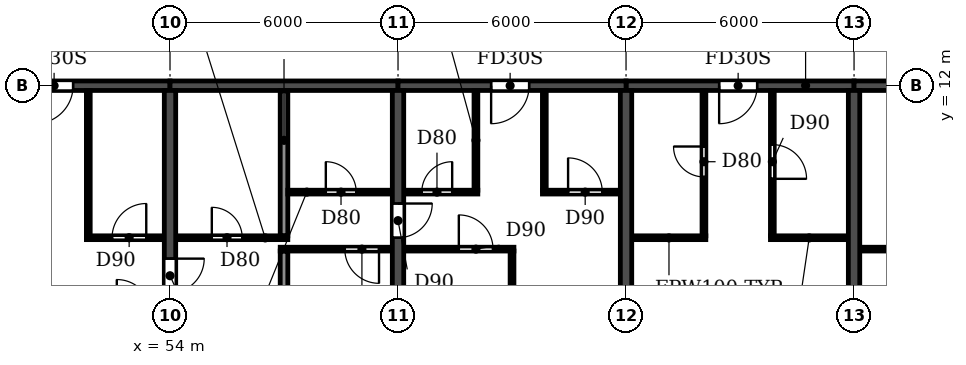
"""IFC4 building model, lengths in metres.
Left out: names, types, materials, properties, quantities, classifications, styles, units other than length and angle.
Written with IfcOpenShell. Run it as: python <this file> out.ifc"""

import sys

from ifc_helpers import new_model, si_unit, direction, frame, frame_2d, origin, place, context, subcontext, project, spatial, rectangle, extrude, element, fill, save


model = new_model("IFC4")
c1 = context("Model", 3, precision=1e-05, world=origin(), true_north=direction((0.0, 1.0)))
c2 = subcontext(c1, "Body", "Model", "MODEL_VIEW")
j1 = project(units=[si_unit("LENGTHUNIT", "METRE"), si_unit("PLANEANGLEUNIT", "RADIAN")], contexts=[c1])
p1 = place(None, origin())
s1 = spatial("IfcSite", under=j1, at=p1, CompositionType="ELEMENT")
p2 = place(p1, origin())
s2 = spatial("IfcBuilding", under=s1, at=p2, CompositionType="ELEMENT")
p3 = place(p2, frame((0.0, 0.0, 152.1)))
s3 = spatial("IfcBuildingStorey", under=s2, at=p3, CompositionType="ELEMENT", Elevation=152.1)
p4 = place(p3, frame((54.0, 0.2, 0.0), z_axis=(0.0, 0.0, 1.0), x_axis=(0.0, 1.0, 0.0)))
e1 = element("IfcWall", 1, at=p4, inside=s3, PredefinedType="SHEAR", context=c2, shape_type="SweptSolid", body=[
    extrude(rectangle(XDim=11.675, YDim=0.3, at=frame_2d((5.837, 0.0))), origin(), (0.0, 0.0, 1.0), 3.07),
])
p5 = place(p4, frame((6.35, 0.0, 0.0)))
e2 = element("IfcOpeningElement", 2, at=p5, cuts=e1, PredefinedType="OPENING", context=c2, shape_type="SweptSolid", body=[
    extrude(rectangle(XDim=0.9, YDim=2.1, at=frame_2d((0.45, 1.05))), frame((0.0, 0.16, 0.0), z_axis=(0.0, -1.0, 0.0), x_axis=(1.0, 0.0, 0.0)), (0.0, 0.0, 1.0), 0.32),
])
p6 = place(p3, frame((60.0, 0.2, 0.0), z_axis=(0.0, 0.0, 1.0), x_axis=(0.0, 1.0, 0.0)))
e3 = element("IfcWall", 3, at=p6, inside=s3, PredefinedType="SHEAR", context=c2, shape_type="SweptSolid", body=[
    extrude(rectangle(XDim=11.675, YDim=0.3, at=frame_2d((5.837, 0.0))), origin(), (0.0, 0.0, 1.0), 3.07),
])
p7 = place(p6, frame((7.8, 0.0, 0.0)))
e4 = element("IfcOpeningElement", 4, at=p7, cuts=e3, PredefinedType="OPENING", context=c2, shape_type="SweptSolid", body=[
    extrude(rectangle(XDim=0.9, YDim=2.1, at=frame_2d((0.45, 1.05))), frame((0.0, 0.16, 0.0), z_axis=(0.0, -1.0, 0.0), x_axis=(1.0, 0.0, 0.0)), (0.0, 0.0, 1.0), 0.32),
])
for number, where, z_axis, x_axis in (
    (5, (66.0, 0.2, 0.0), (0.0, 0.0, 1.0), (0.0, 1.0, 0.0)),
    (6, (72.0, 0.2, 0.0), (0.0, 0.0, 1.0), (0.0, 1.0, 0.0)),
):
    element("IfcWall", number, at=place(p3, frame(where, z_axis=z_axis, x_axis=x_axis)), inside=s3, PredefinedType="SHEAR", context=c2, shape_type="SweptSolid", body=[
        extrude(rectangle(XDim=11.675, YDim=0.3, at=frame_2d((5.837, 0.0))), origin(), (0.0, 0.0, 1.0), 3.07),
    ])
p8 = place(p3, frame((48.0, 12.0, 0.0), z_axis=(0.0, 0.0, 1.0), x_axis=(1.0, 0.0, 0.0)))
e7 = element("IfcWall", 7, at=p8, inside=s3, PredefinedType="SHEAR", context=c2, shape_type="SweptSolid", body=[
    extrude(rectangle(XDim=6.0, YDim=0.25, at=frame_2d((3.0, 0.0))), origin(), (0.0, 0.0, 1.0), 2.47),
])
p9 = place(p8, frame((2.45, 0.0, 0.0)))
e8 = element("IfcOpeningElement", 8, at=p9, cuts=e7, PredefinedType="OPENING", context=c2, shape_type="SweptSolid", body=[
    extrude(rectangle(XDim=1.0, YDim=2.1, at=frame_2d((0.5, 1.05))), frame((0.0, 0.135, 0.0), z_axis=(0.0, -1.0, 0.0), x_axis=(1.0, 0.0, 0.0)), (0.0, 0.0, 1.0), 0.27),
])
p10 = place(p3, frame((54.0, 12.0, 0.0), z_axis=(0.0, 0.0, 1.0), x_axis=(1.0, 0.0, 0.0)))
e9 = element("IfcWall", 9, at=p10, inside=s3, PredefinedType="SHEAR", context=c2, shape_type="SweptSolid", body=[
    extrude(rectangle(XDim=6.0, YDim=0.25, at=frame_2d((3.0, 0.0))), origin(), (0.0, 0.0, 1.0), 2.47),
])
p11 = place(p3, frame((60.0, 12.0, 0.0), z_axis=(0.0, 0.0, 1.0), x_axis=(1.0, 0.0, 0.0)))
e10 = element("IfcWall", 10, at=p11, inside=s3, PredefinedType="SHEAR", context=c2, shape_type="SweptSolid", body=[
    extrude(rectangle(XDim=6.0, YDim=0.25, at=frame_2d((3.0, 0.0))), origin(), (0.0, 0.0, 1.0), 2.47),
])
p12 = place(p11, frame((2.45, 0.0, 0.0)))
e11 = element("IfcOpeningElement", 11, at=p12, cuts=e10, PredefinedType="OPENING", context=c2, shape_type="SweptSolid", body=[
    extrude(rectangle(XDim=1.0, YDim=2.1, at=frame_2d((0.5, 1.05))), frame((0.0, 0.135, 0.0), z_axis=(0.0, -1.0, 0.0), x_axis=(1.0, 0.0, 0.0)), (0.0, 0.0, 1.0), 0.27),
])
p13 = place(p3, frame((66.0, 12.0, 0.0), z_axis=(0.0, 0.0, 1.0), x_axis=(1.0, 0.0, 0.0)))
e12 = element("IfcWall", 12, at=p13, inside=s3, PredefinedType="SHEAR", context=c2, shape_type="SweptSolid", body=[
    extrude(rectangle(XDim=6.0, YDim=0.25, at=frame_2d((3.0, 0.0))), origin(), (0.0, 0.0, 1.0), 2.47),
])
p14 = place(p13, frame((2.45, 0.0, 0.0)))
e13 = element("IfcOpeningElement", 13, at=p14, cuts=e12, PredefinedType="OPENING", context=c2, shape_type="SweptSolid", body=[
    extrude(rectangle(XDim=1.0, YDim=2.1, at=frame_2d((0.5, 1.05))), frame((0.0, 0.135, 0.0), z_axis=(0.0, -1.0, 0.0), x_axis=(1.0, 0.0, 0.0)), (0.0, 0.0, 1.0), 0.27),
])
p15 = place(p3, frame((72.0, 12.0, 0.0), z_axis=(0.0, 0.0, 1.0), x_axis=(1.0, 0.0, 0.0)))
e14 = element("IfcWall", 14, at=p15, inside=s3, PredefinedType="SHEAR", context=c2, shape_type="SweptSolid", body=[
    extrude(rectangle(XDim=6.0, YDim=0.25, at=frame_2d((3.0, 0.0))), origin(), (0.0, 0.0, 1.0), 2.47),
])
p16 = place(p15, frame((2.45, 0.0, 0.0)))
e15 = element("IfcOpeningElement", 15, at=p16, cuts=e14, PredefinedType="OPENING", context=c2, shape_type="SweptSolid", body=[
    extrude(rectangle(XDim=1.0, YDim=2.1, at=frame_2d((0.5, 1.05))), frame((0.0, 0.135, 0.0), z_axis=(0.0, -1.0, 0.0), x_axis=(1.0, 0.0, 0.0)), (0.0, 0.0, 1.0), 0.27),
])
p17 = place(p3, frame((57.0, 0.06, 0.0), z_axis=(0.0, 0.0, 1.0), x_axis=(0.0, 1.0, 0.0)))
e16 = element("IfcWall", 16, at=p17, inside=s3, PredefinedType="PARTITIONING", context=c2, shape_type="SweptSolid", body=[
    extrude(rectangle(XDim=7.59, YDim=0.2, at=frame_2d((3.795, 0.0))), origin(), (0.0, 0.0, 1.0), 3.07),
])
p18 = place(p3, frame((57.0, 8.05, 0.0), z_axis=(0.0, 0.0, 1.0), x_axis=(0.0, 1.0, 0.0)))
e17 = element("IfcWall", 17, at=p18, inside=s3, PredefinedType="PARTITIONING", context=c2, shape_type="SweptSolid", body=[
    extrude(rectangle(XDim=3.815, YDim=0.2, at=frame_2d((1.907, 0.0))), origin(), (0.0, 0.0, 1.0), 3.07),
])
p19 = place(p3, frame((56.9, 7.7, 0.0), z_axis=(0.0, 0.0, 1.0), x_axis=(1.0, 0.0, 0.0)))
e18 = element("IfcWall", 18, at=p19, inside=s3, PredefinedType="PARTITIONING", context=c2, shape_type="SweptSolid", body=[
    extrude(rectangle(XDim=2.94, YDim=0.1, at=frame_2d((1.47, 0.0))), origin(), (0.0, 0.0, 1.0), 3.07),
])
p20 = place(p19, frame((1.7, 0.0, 0.0)))
e19 = element("IfcOpeningElement", 19, at=p20, cuts=e18, PredefinedType="OPENING", context=c2, shape_type="SweptSolid", body=[
    extrude(rectangle(XDim=0.9, YDim=2.1, at=frame_2d((0.45, 1.05))), frame((0.0, 0.06, 0.0), z_axis=(0.0, -1.0, 0.0), x_axis=(1.0, 0.0, 0.0)), (0.0, 0.0, 1.0), 0.12),
])
p21 = place(p3, frame((60.16, 7.7, 0.0), z_axis=(0.0, 0.0, 1.0), x_axis=(1.0, 0.0, 0.0)))
e20 = element("IfcWall", 20, at=p21, inside=s3, PredefinedType="PARTITIONING", context=c2, shape_type="SweptSolid", body=[
    extrude(rectangle(XDim=2.89, YDim=0.1, at=frame_2d((1.445, 0.0))), origin(), (0.0, 0.0, 1.0), 3.07),
])
p22 = place(p21, frame((1.44, 0.0, 0.0)))
e21 = element("IfcOpeningElement", 21, at=p22, cuts=e20, PredefinedType="OPENING", context=c2, shape_type="SweptSolid", body=[
    extrude(rectangle(XDim=0.9, YDim=2.1, at=frame_2d((0.45, 1.05))), frame((0.0, 0.06, 0.0), z_axis=(0.0, -1.0, 0.0), x_axis=(1.0, 0.0, 0.0)), (0.0, 0.0, 1.0), 0.12),
])
p23 = place(p3, frame((72.16, 7.7, 0.0), z_axis=(0.0, 0.0, 1.0), x_axis=(1.0, 0.0, 0.0)))
e22 = element("IfcWall", 22, at=p23, inside=s3, PredefinedType="PARTITIONING", context=c2, shape_type="SweptSolid", body=[
    extrude(rectangle(XDim=1.94, YDim=0.1, at=frame_2d((0.97, 0.0))), origin(), (0.0, 0.0, 1.0), 3.07),
])
p24 = place(p3, frame((51.8, 8.0, 0.0), z_axis=(0.0, 0.0, 1.0), x_axis=(1.0, 0.0, 0.0)))
e23 = element("IfcWall", 23, at=p24, inside=s3, PredefinedType="PARTITIONING", context=c2, shape_type="SweptSolid", body=[
    extrude(rectangle(XDim=2.04, YDim=0.1, at=frame_2d((1.02, 0.0))), origin(), (0.0, 0.0, 1.0), 3.07),
])
p25 = place(p24, frame((0.675, 0.0, 0.0)))
e24 = element("IfcOpeningElement", 24, at=p25, cuts=e23, PredefinedType="OPENING", context=c2, shape_type="SweptSolid", body=[
    extrude(rectangle(XDim=0.9, YDim=2.1, at=frame_2d((0.45, 1.05))), frame((0.0, 0.06, 0.0), z_axis=(0.0, -1.0, 0.0), x_axis=(1.0, 0.0, 0.0)), (0.0, 0.0, 1.0), 0.12),
])
p26 = place(p3, frame((54.16, 8.0, 0.0), z_axis=(0.0, 0.0, 1.0), x_axis=(1.0, 0.0, 0.0)))
e25 = element("IfcWall", 25, at=p26, inside=s3, PredefinedType="PARTITIONING", context=c2, shape_type="SweptSolid", body=[
    extrude(rectangle(XDim=2.94, YDim=0.1, at=frame_2d((1.47, 0.0))), origin(), (0.0, 0.0, 1.0), 3.07),
])
p27 = place(p26, frame((0.94, 0.0, 0.0)))
e26 = element("IfcOpeningElement", 26, at=p27, cuts=e25, PredefinedType="OPENING", context=c2, shape_type="SweptSolid", body=[
    extrude(rectangle(XDim=0.8, YDim=2.1, at=frame_2d((0.4, 1.05))), frame((0.0, 0.06, 0.0), z_axis=(0.0, -1.0, 0.0), x_axis=(1.0, 0.0, 0.0)), (0.0, 0.0, 1.0), 0.12),
])
p28 = place(p3, frame((66.16, 8.0, 0.0), z_axis=(0.0, 0.0, 1.0), x_axis=(1.0, 0.0, 0.0)))
e27 = element("IfcWall", 27, at=p28, inside=s3, PredefinedType="PARTITIONING", context=c2, shape_type="SweptSolid", body=[
    extrude(rectangle(XDim=1.94, YDim=0.1, at=frame_2d((0.97, 0.0))), origin(), (0.0, 0.0, 1.0), 3.07),
])
p29 = place(p3, frame((69.8, 8.0, 0.0), z_axis=(0.0, 0.0, 1.0), x_axis=(1.0, 0.0, 0.0)))
e28 = element("IfcWall", 28, at=p29, inside=s3, PredefinedType="PARTITIONING", context=c2, shape_type="SweptSolid", body=[
    extrude(rectangle(XDim=2.04, YDim=0.1, at=frame_2d((1.02, 0.0))), origin(), (0.0, 0.0, 1.0), 3.07),
])
p30 = place(p3, frame((57.1, 9.2, 0.0), z_axis=(0.0, 0.0, 1.0), x_axis=(1.0, 0.0, 0.0)))
e29 = element("IfcWall", 29, at=p30, inside=s3, PredefinedType="PARTITIONING", context=c2, shape_type="SweptSolid", body=[
    extrude(rectangle(XDim=2.74, YDim=0.1, at=frame_2d((1.37, 0.0))), origin(), (0.0, 0.0, 1.0), 3.07),
])
p31 = place(p30, frame((1.0, 0.0, 0.0)))
e30 = element("IfcOpeningElement", 30, at=p31, cuts=e29, PredefinedType="OPENING", context=c2, shape_type="SweptSolid", body=[
    extrude(rectangle(XDim=0.8, YDim=2.1, at=frame_2d((0.4, 1.05))), frame((0.0, 0.06, 0.0), z_axis=(0.0, -1.0, 0.0), x_axis=(1.0, 0.0, 0.0)), (0.0, 0.0, 1.0), 0.12),
])
p32 = place(p3, frame((60.16, 9.2, 0.0), z_axis=(0.0, 0.0, 1.0), x_axis=(1.0, 0.0, 0.0)))
e31 = element("IfcWall", 31, at=p32, inside=s3, PredefinedType="PARTITIONING", context=c2, shape_type="SweptSolid", body=[
    extrude(rectangle(XDim=1.94, YDim=0.1, at=frame_2d((0.97, 0.0))), origin(), (0.0, 0.0, 1.0), 3.07),
])
p33 = place(p32, frame((0.465, 0.0, 0.0)))
e32 = element("IfcOpeningElement", 32, at=p33, cuts=e31, PredefinedType="OPENING", context=c2, shape_type="SweptSolid", body=[
    extrude(rectangle(XDim=0.8, YDim=2.1, at=frame_2d((0.4, 1.05))), frame((0.0, 0.06, 0.0), z_axis=(0.0, -1.0, 0.0), x_axis=(1.0, 0.0, 0.0)), (0.0, 0.0, 1.0), 0.12),
])
p34 = place(p3, frame((63.8, 9.2, 0.0), z_axis=(0.0, 0.0, 1.0), x_axis=(1.0, 0.0, 0.0)))
e33 = element("IfcWall", 33, at=p34, inside=s3, PredefinedType="PARTITIONING", context=c2, shape_type="SweptSolid", body=[
    extrude(rectangle(XDim=2.04, YDim=0.1, at=frame_2d((1.02, 0.0))), origin(), (0.0, 0.0, 1.0), 3.07),
])
p35 = place(p34, frame((0.675, 0.0, 0.0)))
e34 = element("IfcOpeningElement", 34, at=p35, cuts=e33, PredefinedType="OPENING", context=c2, shape_type="SweptSolid", body=[
    extrude(rectangle(XDim=0.9, YDim=2.1, at=frame_2d((0.45, 1.05))), frame((0.0, 0.06, 0.0), z_axis=(0.0, -1.0, 0.0), x_axis=(1.0, 0.0, 0.0)), (0.0, 0.0, 1.0), 0.12),
])
p36 = place(p3, frame((51.85, 8.05, 0.0), z_axis=(0.0, 0.0, 1.0), x_axis=(0.0, 1.0, 0.0)))
e35 = element("IfcWall", 35, at=p36, inside=s3, PredefinedType="PARTITIONING", context=c2, shape_type="SweptSolid", body=[
    extrude(rectangle(XDim=3.815, YDim=0.1, at=frame_2d((1.907, 0.0))), origin(), (0.0, 0.0, 1.0), 3.07),
])
p37 = place(p3, frame((62.05, 9.25, 0.0), z_axis=(0.0, 0.0, 1.0), x_axis=(0.0, 1.0, 0.0)))
e36 = element("IfcWall", 36, at=p37, inside=s3, PredefinedType="PARTITIONING", context=c2, shape_type="SweptSolid", body=[
    extrude(rectangle(XDim=2.615, YDim=0.1, at=frame_2d((1.308, 0.0))), origin(), (0.0, 0.0, 1.0), 3.07),
])
p38 = place(p3, frame((63.0, 0.06, 0.0), z_axis=(0.0, 0.0, 1.0), x_axis=(0.0, 1.0, 0.0)))
e37 = element("IfcWall", 37, at=p38, inside=s3, PredefinedType="PARTITIONING", context=c2, shape_type="SweptSolid", body=[
    extrude(rectangle(XDim=7.59, YDim=0.1, at=frame_2d((3.795, 0.0))), origin(), (0.0, 0.0, 1.0), 3.07),
])
p39 = place(p3, frame((63.85, 9.25, 0.0), z_axis=(0.0, 0.0, 1.0), x_axis=(0.0, 1.0, 0.0)))
e38 = element("IfcWall", 38, at=p39, inside=s3, PredefinedType="PARTITIONING", context=c2, shape_type="SweptSolid", body=[
    extrude(rectangle(XDim=2.615, YDim=0.1, at=frame_2d((1.308, 0.0))), origin(), (0.0, 0.0, 1.0), 3.07),
])
p40 = place(p3, frame((68.05, 8.05, 0.0), z_axis=(0.0, 0.0, 1.0), x_axis=(0.0, 1.0, 0.0)))
e39 = element("IfcWall", 39, at=p40, inside=s3, PredefinedType="PARTITIONING", context=c2, shape_type="SweptSolid", body=[
    extrude(rectangle(XDim=3.815, YDim=0.1, at=frame_2d((1.907, 0.0))), origin(), (0.0, 0.0, 1.0), 3.07),
])
p41 = place(p40, frame((1.55, 0.0, 0.0)))
e40 = element("IfcOpeningElement", 40, at=p41, cuts=e39, PredefinedType="OPENING", context=c2, shape_type="SweptSolid", body=[
    extrude(rectangle(XDim=0.8, YDim=2.1, at=frame_2d((0.4, 1.05))), frame((0.0, 0.06, 0.0), z_axis=(0.0, -1.0, 0.0), x_axis=(1.0, 0.0, 0.0)), (0.0, 0.0, 1.0), 0.12),
])
p42 = place(p3, frame((69.85, 8.05, 0.0), z_axis=(0.0, 0.0, 1.0), x_axis=(0.0, 1.0, 0.0)))
e41 = element("IfcWall", 41, at=p42, inside=s3, PredefinedType="PARTITIONING", context=c2, shape_type="SweptSolid", body=[
    extrude(rectangle(XDim=3.815, YDim=0.1, at=frame_2d((1.907, 0.0))), origin(), (0.0, 0.0, 1.0), 3.07),
])
p43 = place(p42, frame((1.5, 0.0, 0.0)))
e42 = element("IfcOpeningElement", 42, at=p43, cuts=e41, PredefinedType="OPENING", context=c2, shape_type="SweptSolid", body=[
    extrude(rectangle(XDim=0.9, YDim=2.1, at=frame_2d((0.45, 1.05))), frame((0.0, 0.06, 0.0), z_axis=(0.0, -1.0, 0.0), x_axis=(1.0, 0.0, 0.0)), (0.0, 0.0, 1.0), 0.12),
])
p44 = place(p27, origin())
e43 = element("IfcDoor", 43, at=p44, inside=s3, OperationType="SINGLE_SWING_LEFT", PredefinedType="DOOR", context=c2, shape_type="SweptSolid", body=[
    extrude(rectangle(XDim=0.8, YDim=2.1, at=frame_2d((0.4, 1.05))), frame((0.0, 0.025, 0.0), z_axis=(0.0, -1.0, 0.0), x_axis=(1.0, 0.0, 0.0)), (0.0, 0.0, 1.0), 0.05),
])
fill(e26, e43)
p45 = place(p9, frame((1.0, 0.0, 0.0), z_axis=(0.0, 0.0, 1.0), x_axis=(-1.0, 0.0, 0.0)))
e44 = element("IfcDoor", 44, at=p45, inside=s3, OperationType="SINGLE_SWING_RIGHT", PredefinedType="DOOR", context=c2, shape_type="SweptSolid", body=[
    extrude(rectangle(XDim=1.0, YDim=2.1, at=frame_2d((0.5, 1.05))), frame((0.0, 0.025, 0.0), z_axis=(0.0, -1.0, 0.0), x_axis=(1.0, 0.0, 0.0)), (0.0, 0.0, 1.0), 0.05),
])
fill(e8, e44)
p46 = place(p25, origin())
e45 = element("IfcDoor", 45, at=p46, inside=s3, OperationType="SINGLE_SWING_RIGHT", PredefinedType="DOOR", context=c2, shape_type="SweptSolid", body=[
    extrude(rectangle(XDim=0.9, YDim=2.1, at=frame_2d((0.45, 1.05))), frame((0.0, 0.025, 0.0), z_axis=(0.0, -1.0, 0.0), x_axis=(1.0, 0.0, 0.0)), (0.0, 0.0, 1.0), 0.05),
])
fill(e24, e45)
p47 = place(p5, frame((0.9, 0.0, 0.0), z_axis=(0.0, 0.0, 1.0), x_axis=(-1.0, 0.0, 0.0)))
e46 = element("IfcDoor", 46, at=p47, inside=s3, OperationType="SINGLE_SWING_LEFT", PredefinedType="DOOR", context=c2, shape_type="SweptSolid", body=[
    extrude(rectangle(XDim=0.9, YDim=2.1, at=frame_2d((0.45, 1.05))), frame((0.0, 0.025, 0.0), z_axis=(0.0, -1.0, 0.0), x_axis=(1.0, 0.0, 0.0)), (0.0, 0.0, 1.0), 0.05),
])
fill(e2, e46)
p48 = place(p31, origin())
e47 = element("IfcDoor", 47, at=p48, inside=s3, OperationType="SINGLE_SWING_LEFT", PredefinedType="DOOR", context=c2, shape_type="SweptSolid", body=[
    extrude(rectangle(XDim=0.8, YDim=2.1, at=frame_2d((0.4, 1.05))), frame((0.0, 0.025, 0.0), z_axis=(0.0, -1.0, 0.0), x_axis=(1.0, 0.0, 0.0)), (0.0, 0.0, 1.0), 0.05),
])
fill(e30, e47)
p49 = place(p20, frame((0.9, 0.0, 0.0), z_axis=(0.0, 0.0, 1.0), x_axis=(-1.0, 0.0, 0.0)))
e48 = element("IfcDoor", 48, at=p49, inside=s3, OperationType="SINGLE_SWING_LEFT", PredefinedType="DOOR", context=c2, shape_type="SweptSolid", body=[
    extrude(rectangle(XDim=0.9, YDim=2.1, at=frame_2d((0.45, 1.05))), frame((0.0, 0.025, 0.0), z_axis=(0.0, -1.0, 0.0), x_axis=(1.0, 0.0, 0.0)), (0.0, 0.0, 1.0), 0.05),
])
fill(e19, e48)
p50 = place(p7, frame((0.9, 0.0, 0.0), z_axis=(0.0, 0.0, 1.0), x_axis=(-1.0, 0.0, 0.0)))
e49 = element("IfcDoor", 49, at=p50, inside=s3, OperationType="SINGLE_SWING_LEFT", PredefinedType="DOOR", context=c2, shape_type="SweptSolid", body=[
    extrude(rectangle(XDim=0.9, YDim=2.1, at=frame_2d((0.45, 1.05))), frame((0.0, 0.025, 0.0), z_axis=(0.0, -1.0, 0.0), x_axis=(1.0, 0.0, 0.0)), (0.0, 0.0, 1.0), 0.05),
])
fill(e4, e49)
p51 = place(p33, origin())
e50 = element("IfcDoor", 50, at=p51, inside=s3, OperationType="SINGLE_SWING_RIGHT", PredefinedType="DOOR", context=c2, shape_type="SweptSolid", body=[
    extrude(rectangle(XDim=0.8, YDim=2.1, at=frame_2d((0.4, 1.05))), frame((0.0, 0.025, 0.0), z_axis=(0.0, -1.0, 0.0), x_axis=(1.0, 0.0, 0.0)), (0.0, 0.0, 1.0), 0.05),
])
fill(e32, e50)
p52 = place(p22, origin())
e51 = element("IfcDoor", 51, at=p52, inside=s3, OperationType="SINGLE_SWING_LEFT", PredefinedType="DOOR", context=c2, shape_type="SweptSolid", body=[
    extrude(rectangle(XDim=0.9, YDim=2.1, at=frame_2d((0.45, 1.05))), frame((0.0, 0.025, 0.0), z_axis=(0.0, -1.0, 0.0), x_axis=(1.0, 0.0, 0.0)), (0.0, 0.0, 1.0), 0.05),
])
fill(e21, e51)
p53 = place(p12, frame((1.0, 0.0, 0.0), z_axis=(0.0, 0.0, 1.0), x_axis=(-1.0, 0.0, 0.0)))
e52 = element("IfcDoor", 52, at=p53, inside=s3, OperationType="SINGLE_SWING_RIGHT", PredefinedType="DOOR", context=c2, shape_type="SweptSolid", body=[
    extrude(rectangle(XDim=1.0, YDim=2.1, at=frame_2d((0.5, 1.05))), frame((0.0, 0.025, 0.0), z_axis=(0.0, -1.0, 0.0), x_axis=(1.0, 0.0, 0.0)), (0.0, 0.0, 1.0), 0.05),
])
fill(e11, e52)
p54 = place(p35, origin())
e53 = element("IfcDoor", 53, at=p54, inside=s3, OperationType="SINGLE_SWING_LEFT", PredefinedType="DOOR", context=c2, shape_type="SweptSolid", body=[
    extrude(rectangle(XDim=0.9, YDim=2.1, at=frame_2d((0.45, 1.05))), frame((0.0, 0.025, 0.0), z_axis=(0.0, -1.0, 0.0), x_axis=(1.0, 0.0, 0.0)), (0.0, 0.0, 1.0), 0.05),
])
fill(e34, e53)
p55 = place(p41, origin())
e54 = element("IfcDoor", 54, at=p55, inside=s3, OperationType="SINGLE_SWING_RIGHT", PredefinedType="DOOR", context=c2, shape_type="SweptSolid", body=[
    extrude(rectangle(XDim=0.8, YDim=2.1, at=frame_2d((0.4, 1.05))), frame((0.0, 0.025, 0.0), z_axis=(0.0, -1.0, 0.0), x_axis=(1.0, 0.0, 0.0)), (0.0, 0.0, 1.0), 0.05),
])
fill(e40, e54)
p56 = place(p14, frame((1.0, 0.0, 0.0), z_axis=(0.0, 0.0, 1.0), x_axis=(-1.0, 0.0, 0.0)))
e55 = element("IfcDoor", 55, at=p56, inside=s3, OperationType="SINGLE_SWING_RIGHT", PredefinedType="DOOR", context=c2, shape_type="SweptSolid", body=[
    extrude(rectangle(XDim=1.0, YDim=2.1, at=frame_2d((0.5, 1.05))), frame((0.0, 0.025, 0.0), z_axis=(0.0, -1.0, 0.0), x_axis=(1.0, 0.0, 0.0)), (0.0, 0.0, 1.0), 0.05),
])
fill(e13, e55)
p57 = place(p43, frame((0.9, 0.0, 0.0), z_axis=(0.0, 0.0, 1.0), x_axis=(-1.0, 0.0, 0.0)))
e56 = element("IfcDoor", 56, at=p57, inside=s3, OperationType="SINGLE_SWING_RIGHT", PredefinedType="DOOR", context=c2, shape_type="SweptSolid", body=[
    extrude(rectangle(XDim=0.9, YDim=2.1, at=frame_2d((0.45, 1.05))), frame((0.0, 0.025, 0.0), z_axis=(0.0, -1.0, 0.0), x_axis=(1.0, 0.0, 0.0)), (0.0, 0.0, 1.0), 0.05),
])
fill(e42, e56)
save(model, sys.argv[1])
